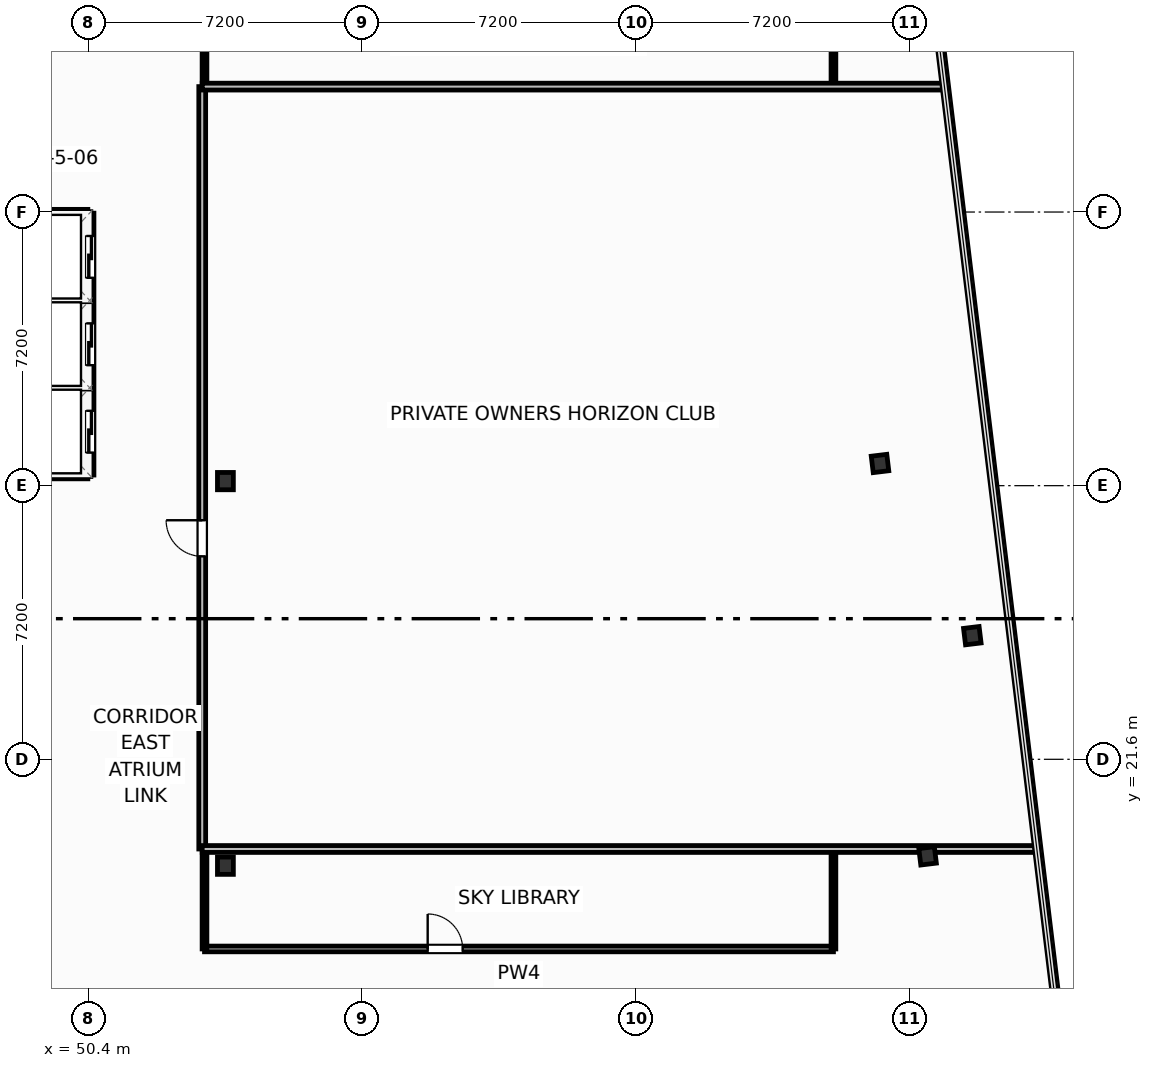
"""IFC4 building model, lengths in metres.
Left out: names, types, materials, properties, quantities, classifications, styles, units other than length and angle.
Written with IfcOpenShell. Run it as: python <this file> out.ifc"""

import sys

from ifc_helpers import new_model, si_unit, direction, frame, frame_2d, origin, origin_2d, place, context, subcontext, project, spatial, rectangle, i_section, extrude, element, fill, save


model = new_model("IFC4")
c1 = context("Model", 3, precision=1e-05, world=origin(), true_north=direction((0.0, 1.0)))
c2 = subcontext(c1, "Body", "Model", "MODEL_VIEW")
j1 = project(units=[si_unit("LENGTHUNIT", "METRE"), si_unit("PLANEANGLEUNIT", "RADIAN")], contexts=[c1])
p1 = place(None, origin())
s1 = spatial("IfcSite", under=j1, at=p1, CompositionType="ELEMENT")
p2 = place(p1, origin())
s2 = spatial("IfcBuilding", under=s1, at=p2, CompositionType="ELEMENT")
p3 = place(p2, frame((0.0, 0.0, 200.5)))
s3 = spatial("IfcBuildingStorey", under=s2, at=p3, CompositionType="ELEMENT", Elevation=200.5)
for number, where, z_axis, x_axis in (
    (1, (54.0, 18.8, 0.0), (0.0, 0.0, 1.0), (1.0, 0.0, 0.0)),
    (2, (54.0, 28.92, 0.0), (0.0, 0.0, 1.0), (1.0, 0.0, 0.0)),
):
    element("IfcColumn", number, at=place(p3, frame(where, z_axis=z_axis, x_axis=x_axis)), inside=s3, PredefinedType="COLUMN", context=c2, shape_type="SweptSolid", body=[
        extrude(i_section(OverallWidth=0.418, OverallDepth=0.455, WebThickness=0.042, FlangeThickness=0.068, FilletRadius=0.025, at=origin_2d()), origin(), (0.0, 0.0, 1.0), 3.7),
    ])
for number, where, z_axis, x_axis in (
    (3, (72.477, 19.059, 0.0), (0.0, 0.0, 1.0), (0.993, 0.12, 0.0)),
    (4, (73.654, 24.853, 0.0), (0.0, 0.0, 1.0), (0.993, 0.12, 0.0)),
    (5, (71.225, 29.384, 0.0), (0.0, 0.0, 1.0), (0.993, 0.12, 0.0)),
):
    element("IfcColumn", number, at=place(p3, frame(where, z_axis=z_axis, x_axis=x_axis)), inside=s3, PredefinedType="COLUMN", context=c2, shape_type="SweptSolid", body=[
        extrude(i_section(OverallWidth=0.412, OverallDepth=0.435, WebThickness=0.036, FlangeThickness=0.057, FilletRadius=0.025, at=origin_2d()), origin(), (0.0, 0.0, 1.0), 3.7),
    ])
p4 = place(p3, frame((53.45, 16.61, 0.0), z_axis=(0.0, 0.0, 1.0), x_axis=(1.0, 0.0, 0.0)))
e6 = element("IfcWall", 6, at=p4, inside=s3, PredefinedType="PARTITIONING", context=c2, shape_type="SweptSolid", body=[
    extrude(rectangle(XDim=16.55, YDim=0.15, at=frame_2d((8.275, 0.0))), origin(), (0.0, 0.0, 1.0), 3.45),
])
p5 = place(p4, frame((5.873, 0.0, 0.0)))
e7 = element("IfcOpeningElement", 7, at=p5, cuts=e6, PredefinedType="OPENING", context=c2, shape_type="SweptSolid", body=[
    extrude(rectangle(XDim=0.92, YDim=2.05, at=frame_2d((0.46, 1.025))), frame((0.0, 0.085, 0.0), z_axis=(0.0, -1.0, 0.0), x_axis=(1.0, 0.0, 0.0)), (0.0, 0.0, 1.0), 0.17),
])
p6 = place(p3, frame((53.45, 16.61, 0.0), z_axis=(0.0, 0.0, 1.0), x_axis=(0.0, 1.0, 0.0)))
e8 = element("IfcWall", 8, at=p6, inside=s3, PredefinedType="PARTITIONING", context=c2, shape_type="SweptSolid", body=[
    extrude(rectangle(XDim=2.63, YDim=0.125, at=frame_2d((1.315, 0.0))), origin(), (0.0, 0.0, 1.0), 2.662),
])
p7 = place(p3, frame((70.0, 16.61, 0.0), z_axis=(0.0, 0.0, 1.0), x_axis=(0.0, 1.0, 0.0)))
e9 = element("IfcWall", 9, at=p7, inside=s3, PredefinedType="PARTITIONING", context=c2, shape_type="SweptSolid", body=[
    extrude(rectangle(XDim=2.63, YDim=0.125, at=frame_2d((1.315, 0.0))), origin(), (0.0, 0.0, 1.0), 3.45),
])
for number, where, z_axis, x_axis in (
    (10, (53.45, 39.3, 0.0), (0.0, 0.0, 1.0), (0.0, 1.0, 0.0)),
    (11, (70.0, 39.3, 0.0), (0.0, 0.0, 1.0), (0.0, 1.0, 0.0)),
):
    element("IfcWall", number, at=place(p3, frame(where, z_axis=z_axis, x_axis=x_axis)), inside=s3, PredefinedType="PARTITIONING", context=c2, shape_type="SweptSolid", body=[
        extrude(rectangle(XDim=2.31, YDim=0.125, at=frame_2d((1.155, 0.0))), origin(), (0.0, 0.0, 1.0), 3.45),
    ])
p8 = place(p3, frame((53.39, 19.24, 0.0), z_axis=(0.0, 0.0, 1.0), x_axis=(0.0, 1.0, 0.0)))
e12 = element("IfcWall", 12, at=p8, inside=s3, PredefinedType="PARTITIONING", context=c2, shape_type="SweptSolid", body=[
    extrude(rectangle(XDim=20.06, YDim=0.18, at=frame_2d((10.03, 0.0))), origin(), (0.0, 0.0, 1.0), 3.45),
])
p9 = place(p8, frame((7.7, 0.0, 0.0)))
e13 = element("IfcOpeningElement", 13, at=p9, cuts=e12, PredefinedType="OPENING", context=c2, shape_type="SweptSolid", body=[
    extrude(rectangle(XDim=0.95, YDim=2.05, at=frame_2d((0.475, 1.025))), frame((0.0, 0.1, 0.0), z_axis=(0.0, -1.0, 0.0), x_axis=(1.0, 0.0, 0.0)), (0.0, 0.0, 1.0), 0.2),
])
p10 = place(p3, frame((53.39, 19.24, 0.0), z_axis=(0.0, 0.0, 1.0), x_axis=(1.0, 0.0, 0.0)))
e14 = element("IfcWall", 14, at=p10, inside=s3, PredefinedType="PARTITIONING", context=c2, shape_type="SweptSolid", body=[
    extrude(rectangle(XDim=21.922, YDim=0.18, at=frame_2d((10.961, 0.0))), origin(), (0.0, 0.0, 1.0), 2.662),
])
p11 = place(p3, frame((53.39, 39.3, 0.0), z_axis=(0.0, 0.0, 1.0), x_axis=(1.0, 0.0, 0.0)))
e15 = element("IfcWall", 15, at=p11, inside=s3, PredefinedType="PARTITIONING", context=c2, shape_type="SweptSolid", body=[
    extrude(rectangle(XDim=19.49, YDim=0.18, at=frame_2d((9.745, 0.0))), origin(), (0.0, 0.0, 1.0), 3.45),
])
for number, where, z_axis, x_axis in (
    (16, (48.32, 31.375, 0.0), (0.0, 0.0, 1.0), (1.0, 0.0, 0.0)),
    (17, (48.32, 33.675, 0.0), (0.0, 0.0, 1.0), (1.0, 0.0, 0.0)),
):
    element("IfcWall", number, at=place(p3, frame(where, z_axis=z_axis, x_axis=x_axis)), inside=s3, PredefinedType="PARTITIONING", context=c2, shape_type="SweptSolid", body=[
        extrude(rectangle(XDim=2.06, YDim=0.2, at=frame_2d((1.03, 0.0))), origin(), (0.0, 0.0, 1.0), 3.45),
    ])
p12 = place(p3, frame((48.32, 29.08, 0.0), z_axis=(0.0, 0.0, 1.0), x_axis=(1.0, 0.0, 0.0)))
e18 = element("IfcWall", 18, at=p12, inside=s3, PredefinedType="PARTITIONING", context=c2, shape_type="SweptSolid", body=[
    extrude(rectangle(XDim=2.06, YDim=0.2, at=frame_2d((1.03, 0.0))), origin(), (0.0, 0.0, 1.0), 2.662),
])
p13 = place(p3, frame((48.32, 35.97, 0.0), z_axis=(0.0, 0.0, 1.0), x_axis=(1.0, 0.0, 0.0)))
e19 = element("IfcWall", 19, at=p13, inside=s3, PredefinedType="PARTITIONING", context=c2, shape_type="SweptSolid", body=[
    extrude(rectangle(XDim=2.06, YDim=0.2, at=frame_2d((1.03, 0.0))), origin(), (0.0, 0.0, 1.0), 3.45),
])
p14 = place(p3, frame((50.44, 29.08, 0.0), z_axis=(0.0, 0.0, 1.0), x_axis=(0.0, 1.0, 0.0)))
e20 = element("IfcWall", 20, at=p14, inside=s3, PredefinedType="PARTITIONING", context=c2, shape_type="SweptSolid", body=[
    extrude(rectangle(XDim=6.89, YDim=0.2, at=frame_2d((3.445, 0.0))), origin(), (0.0, 0.0, 1.0), 3.45),
])
p15 = place(p14, frame((0.59, 0.0, 0.0)))
e21 = element("IfcOpeningElement", 21, at=p15, cuts=e20, PredefinedType="OPENING", context=c2, shape_type="SweptSolid", body=[
    extrude(rectangle(XDim=1.1, YDim=2.15, at=frame_2d((0.55, 1.075))), frame((0.0, 0.11, 0.0), z_axis=(0.0, -1.0, 0.0), x_axis=(1.0, 0.0, 0.0)), (0.0, 0.0, 1.0), 0.22),
])
p16 = place(p14, frame((2.89, 0.0, 0.0)))
e22 = element("IfcOpeningElement", 22, at=p16, cuts=e20, PredefinedType="OPENING", context=c2, shape_type="SweptSolid", body=[
    extrude(rectangle(XDim=1.1, YDim=2.15, at=frame_2d((0.55, 1.075))), frame((0.0, 0.11, 0.0), z_axis=(0.0, -1.0, 0.0), x_axis=(1.0, 0.0, 0.0)), (0.0, 0.0, 1.0), 0.22),
])
p17 = place(p14, frame((5.19, 0.0, 0.0)))
e23 = element("IfcOpeningElement", 23, at=p17, cuts=e20, PredefinedType="OPENING", context=c2, shape_type="SweptSolid", body=[
    extrude(rectangle(XDim=1.1, YDim=2.15, at=frame_2d((0.55, 1.075))), frame((0.0, 0.11, 0.0), z_axis=(0.0, -1.0, 0.0), x_axis=(1.0, 0.0, 0.0)), (0.0, 0.0, 1.0), 0.22),
])
p18 = place(p5, origin())
e24 = element("IfcDoor", 24, at=p18, inside=s3, OperationType="SINGLE_SWING_LEFT", PredefinedType="DOOR", context=c2, shape_type="SweptSolid", body=[
    extrude(rectangle(XDim=0.92, YDim=2.05, at=frame_2d((0.46, 1.025))), frame((0.0, 0.025, 0.0), z_axis=(0.0, -1.0, 0.0), x_axis=(1.0, 0.0, 0.0)), (0.0, 0.0, 1.0), 0.05),
])
fill(e7, e24)
p19 = place(p9, origin())
e25 = element("IfcDoor", 25, at=p19, inside=s3, OperationType="SINGLE_SWING_RIGHT", PredefinedType="DOOR", context=c2, shape_type="SweptSolid", body=[
    extrude(rectangle(XDim=0.95, YDim=2.05, at=frame_2d((0.475, 1.025))), frame((0.0, 0.025, 0.0), z_axis=(0.0, -1.0, 0.0), x_axis=(1.0, 0.0, 0.0)), (0.0, 0.0, 1.0), 0.05),
])
fill(e13, e25)
p20 = place(p15, origin())
e26 = element("IfcDoor", 26, at=p20, inside=s3, OperationType="SLIDING_TO_LEFT", PredefinedType="DOOR", context=c2, shape_type="SweptSolid", body=[
    extrude(rectangle(XDim=1.1, YDim=2.15, at=frame_2d((0.55, 1.075))), frame((0.0, 0.025, 0.0), z_axis=(0.0, -1.0, 0.0), x_axis=(1.0, 0.0, 0.0)), (0.0, 0.0, 1.0), 0.05),
])
fill(e21, e26)
p21 = place(p16, origin())
e27 = element("IfcDoor", 27, at=p21, inside=s3, OperationType="SLIDING_TO_LEFT", PredefinedType="DOOR", context=c2, shape_type="SweptSolid", body=[
    extrude(rectangle(XDim=1.1, YDim=2.15, at=frame_2d((0.55, 1.075))), frame((0.0, 0.025, 0.0), z_axis=(0.0, -1.0, 0.0), x_axis=(1.0, 0.0, 0.0)), (0.0, 0.0, 1.0), 0.05),
])
fill(e22, e27)
p22 = place(p17, origin())
e28 = element("IfcDoor", 28, at=p22, inside=s3, OperationType="SLIDING_TO_LEFT", PredefinedType="DOOR", context=c2, shape_type="SweptSolid", body=[
    extrude(rectangle(XDim=1.1, YDim=2.15, at=frame_2d((0.55, 1.075))), frame((0.0, 0.025, 0.0), z_axis=(0.0, -1.0, 0.0), x_axis=(1.0, 0.0, 0.0)), (0.0, 0.0, 1.0), 0.05),
])
fill(e23, e28)
save(model, sys.argv[1])
